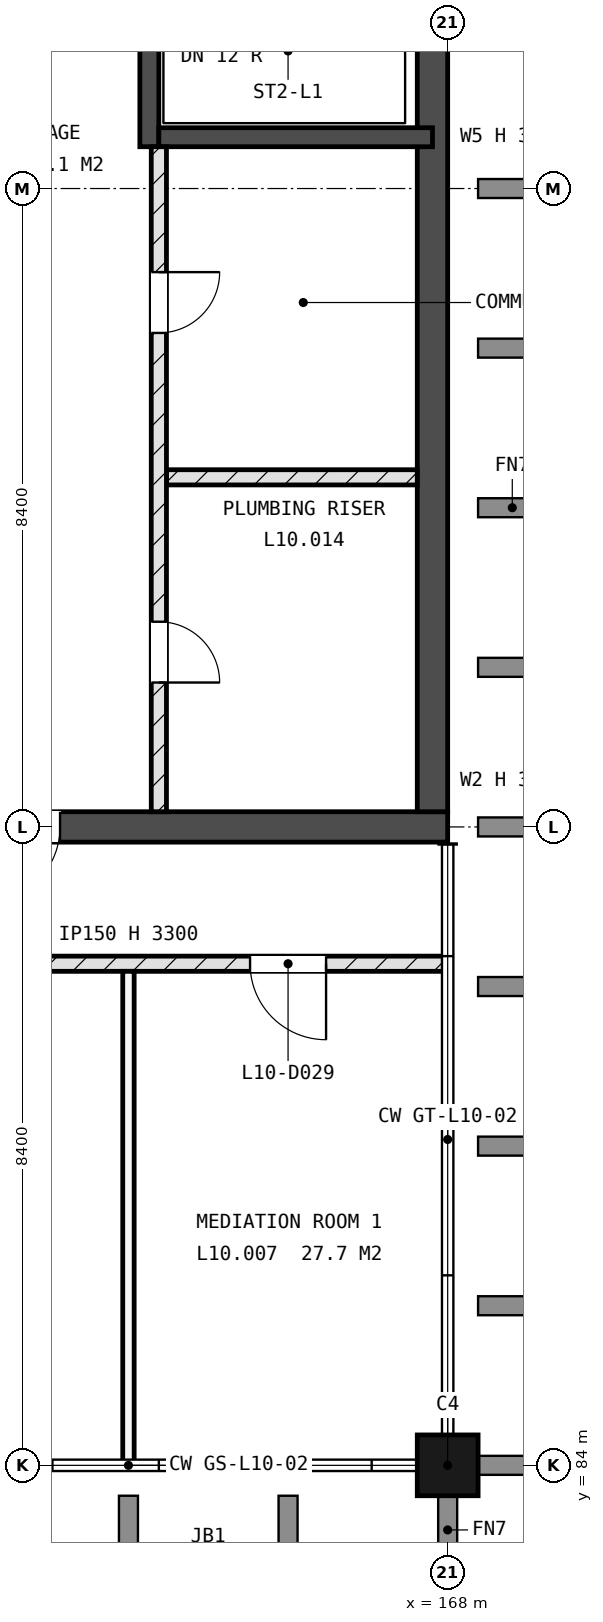
"""IFC4 building model, lengths in metres.
Left out: names, types, materials, properties, quantities, classifications, styles, units other than length and angle.
Written with IfcOpenShell. Run it as: python <this file> out.ifc"""

import sys

from ifc_helpers import new_model, si_unit, direction, frame, frame_2d, origin, origin_2d, place, context, subcontext, project, spatial, rectangle, extrude, element, fill, save


model = new_model("IFC4")
c1 = context("Model", 3, precision=1e-05, world=origin(), true_north=direction((0.0, 1.0)))
c2 = subcontext(c1, "Body", "Model", "MODEL_VIEW")
j1 = project(units=[si_unit("LENGTHUNIT", "METRE"), si_unit("PLANEANGLEUNIT", "RADIAN")], contexts=[c1])
p1 = place(None, origin())
s1 = spatial("IfcSite", under=j1, at=p1, CompositionType="ELEMENT")
p2 = place(p1, origin())
s2 = spatial("IfcBuilding", under=s1, at=p2, CompositionType="ELEMENT")
p3 = place(p2, frame((0.0, 0.0, 39.6)))
s3 = spatial("IfcBuildingStorey", under=s2, at=p3, CompositionType="ELEMENT", Elevation=39.6)
p4 = place(p3, frame((168.0, 84.0, -0.225), z_axis=(0.0, 0.0, 1.0), x_axis=(1.0, 0.0, 0.0)))
e1 = element("IfcColumn", 1, at=p4, inside=s3, PredefinedType="COLUMN", context=c2, shape_type="SweptSolid", body=[
    extrude(rectangle(XDim=0.8, YDim=0.8, at=origin_2d()), origin(), (0.0, 0.0, 1.0), 3.6),
])
p5 = place(p3, frame((142.8, 92.4, -0.225), z_axis=(0.0, 0.0, 1.0), x_axis=(1.0, 0.0, 0.0)))
e2 = element("IfcWall", 2, at=p5, inside=s3, PredefinedType="SHEAR", context=c2, shape_type="SweptSolid", body=[
    extrude(rectangle(XDim=25.2, YDim=0.4, at=frame_2d((12.6, 0.0))), origin(), (0.0, 0.0, 1.0), 3.6),
])
p6 = place(p5, frame((1.4, 0.0, 0.225)))
e3 = element("IfcOpeningElement", 3, at=p6, cuts=e2, PredefinedType="OPENING", context=c2, shape_type="SweptSolid", body=[
    extrude(rectangle(XDim=1.0, YDim=2.1, at=frame_2d((0.5, 1.05))), frame((0.0, 0.21, 0.0), z_axis=(0.0, -1.0, 0.0), x_axis=(1.0, 0.0, 0.0)), (0.0, 0.0, 1.0), 0.42),
])
p7 = place(p5, frame((19.1, 0.0, 0.225)))
e4 = element("IfcOpeningElement", 4, at=p7, cuts=e2, PredefinedType="OPENING", context=c2, shape_type="SweptSolid", body=[
    extrude(rectangle(XDim=1.0, YDim=2.1, at=frame_2d((0.5, 1.05))), frame((0.0, 0.21, 0.0), z_axis=(0.0, -1.0, 0.0), x_axis=(1.0, 0.0, 0.0)), (0.0, 0.0, 1.0), 0.42),
])
p8 = place(p5, frame((10.4, 0.0, 0.225)))
e5 = element("IfcOpeningElement", 5, at=p8, cuts=e2, PredefinedType="OPENING", context=c2, shape_type="SweptSolid", body=[
    extrude(rectangle(XDim=1.0, YDim=2.1, at=frame_2d((0.5, 1.05))), frame((0.0, 0.21, 0.0), z_axis=(0.0, -1.0, 0.0), x_axis=(1.0, 0.0, 0.0)), (0.0, 0.0, 1.0), 0.42),
])
p9 = place(p3, frame((167.8, 92.6, -0.225), z_axis=(0.0, 0.0, 1.0), x_axis=(0.0, 1.0, 0.0)))
e6 = element("IfcWall", 6, at=p9, inside=s3, PredefinedType="SHEAR", context=c2, shape_type="SweptSolid", body=[
    extrude(rectangle(XDim=16.4, YDim=0.4, at=frame_2d((8.2, 0.0))), origin(), (0.0, 0.0, 1.0), 3.6),
])
p10 = place(p9, frame((12.2, 0.0, 1.825)))
e7 = element("IfcOpeningElement", 7, at=p10, cuts=e6, PredefinedType="OPENING", context=c2, shape_type="SweptSolid", body=[
    extrude(rectangle(XDim=1.2, YDim=0.9, at=frame_2d((0.6, 0.45))), frame((0.0, 0.21, 0.0), z_axis=(0.0, -1.0, 0.0), x_axis=(1.0, 0.0, 0.0)), (0.0, 0.0, 1.0), 0.42),
])
p11 = place(p3, frame((164.075, 101.35, -0.225), z_axis=(0.0, 0.0, 1.0), x_axis=(0.0, 1.0, 0.0)))
e8 = element("IfcWall", 8, at=p11, inside=s3, PredefinedType="SHEAR", context=c2, shape_type="SweptSolid", body=[
    extrude(rectangle(XDim=7.65, YDim=0.25, at=frame_2d((3.825, 0.0))), origin(), (0.0, 0.0, 1.0), 3.6),
])
p12 = place(p11, frame((6.55, 0.0, 0.225)))
e9 = element("IfcOpeningElement", 9, at=p12, cuts=e8, PredefinedType="OPENING", context=c2, shape_type="SweptSolid", body=[
    extrude(rectangle(XDim=1.0, YDim=2.1, at=frame_2d((0.5, 1.05))), frame((0.0, 0.135, 0.0), z_axis=(0.0, -1.0, 0.0), x_axis=(1.0, 0.0, 0.0)), (0.0, 0.0, 1.0), 0.27),
])
p13 = place(p3, frame((164.2, 101.475, -0.225), z_axis=(0.0, 0.0, 1.0), x_axis=(1.0, 0.0, 0.0)))
e10 = element("IfcWall", 10, at=p13, inside=s3, PredefinedType="SHEAR", context=c2, shape_type="SweptSolid", body=[
    extrude(rectangle(XDim=3.6, YDim=0.25, at=frame_2d((1.8, 0.0))), origin(), (0.0, 0.0, 1.0), 3.6),
])
p14 = place(p3, frame((151.2, 90.6, 0.0), z_axis=(0.0, 0.0, 1.0), x_axis=(1.0, 0.0, 0.0)))
e11 = element("IfcWall", 11, at=p14, inside=s3, PredefinedType="SOLIDWALL", context=c2, shape_type="SweptSolid", body=[
    extrude(rectangle(XDim=16.8, YDim=0.2, at=frame_2d((8.4, 0.0))), origin(), (0.0, 0.0, 1.0), 3.3),
])
p15 = place(p14, frame((5.8, 0.0, 0.0)))
e12 = element("IfcOpeningElement", 12, at=p15, cuts=e11, PredefinedType="OPENING", context=c2, shape_type="SweptSolid", body=[
    extrude(rectangle(XDim=1.0, YDim=2.1, at=frame_2d((0.5, 1.05))), frame((0.0, 0.11, 0.0), z_axis=(0.0, -1.0, 0.0), x_axis=(1.0, 0.0, 0.0)), (0.0, 0.0, 1.0), 0.22),
])
p16 = place(p14, frame((14.2, 0.0, 0.0)))
e13 = element("IfcOpeningElement", 13, at=p16, cuts=e11, PredefinedType="OPENING", context=c2, shape_type="SweptSolid", body=[
    extrude(rectangle(XDim=1.0, YDim=2.1, at=frame_2d((0.5, 1.05))), frame((0.0, 0.11, 0.0), z_axis=(0.0, -1.0, 0.0), x_axis=(1.0, 0.0, 0.0)), (0.0, 0.0, 1.0), 0.22),
])
p17 = place(p3, frame((164.3, 97.0, 0.0), z_axis=(0.0, 0.0, 1.0), x_axis=(1.0, 0.0, 0.0)))
e14 = element("IfcWall", 14, at=p17, inside=s3, PredefinedType="SOLIDWALL", context=c2, shape_type="SweptSolid", body=[
    extrude(rectangle(XDim=3.3, YDim=0.2, at=frame_2d((1.65, 0.0))), origin(), (0.0, 0.0, 1.0), 3.3),
])
p18 = place(p3, frame((163.8, 84.0, 0.0), z_axis=(0.0, 0.0, 1.0), x_axis=(0.0, 1.0, 0.0)))
e15 = element("IfcWall", 15, at=p18, inside=s3, PredefinedType="PARTITIONING", context=c2, shape_type="SweptSolid", body=[
    extrude(rectangle(XDim=6.5, YDim=0.15, at=frame_2d((3.25, 0.0))), origin(), (0.0, 0.0, 1.0), 3.3),
])
p19 = place(p3, frame((164.2, 92.6, 0.0), z_axis=(0.0, 0.0, 1.0), x_axis=(0.0, 1.0, 0.0)))
e16 = element("IfcWall", 16, at=p19, inside=s3, PredefinedType="SOLIDWALL", context=c2, shape_type="SweptSolid", body=[
    extrude(rectangle(XDim=8.75, YDim=0.2, at=frame_2d((4.375, 0.0))), origin(), (0.0, 0.0, 1.0), 3.3),
])
p20 = place(p19, frame((1.7, 0.0, 0.0)))
e17 = element("IfcOpeningElement", 17, at=p20, cuts=e16, PredefinedType="OPENING", context=c2, shape_type="SweptSolid", body=[
    extrude(rectangle(XDim=0.8, YDim=2.1, at=frame_2d((0.4, 1.05))), frame((0.0, 0.11, 0.0), z_axis=(0.0, -1.0, 0.0), x_axis=(1.0, 0.0, 0.0)), (0.0, 0.0, 1.0), 0.22),
])
p21 = place(p19, frame((6.3, 0.0, 0.0)))
e18 = element("IfcOpeningElement", 18, at=p21, cuts=e16, PredefinedType="OPENING", context=c2, shape_type="SweptSolid", body=[
    extrude(rectangle(XDim=0.8, YDim=2.1, at=frame_2d((0.4, 1.05))), frame((0.0, 0.11, 0.0), z_axis=(0.0, -1.0, 0.0), x_axis=(1.0, 0.0, 0.0)), (0.0, 0.0, 1.0), 0.22),
])
p22 = place(p16, origin())
e19 = element("IfcDoor", 19, at=p22, inside=s3, OperationType="SINGLE_SWING_RIGHT", PredefinedType="DOOR", context=c2, shape_type="SweptSolid", body=[
    extrude(rectangle(XDim=1.0, YDim=2.1, at=frame_2d((0.5, 1.05))), frame((0.0, 0.025, 0.0), z_axis=(0.0, -1.0, 0.0), x_axis=(1.0, 0.0, 0.0)), (0.0, 0.0, 1.0), 0.05),
])
fill(e13, e19)
p23 = place(p20, origin())
e20 = element("IfcDoor", 20, at=p23, inside=s3, OperationType="SINGLE_SWING_LEFT", PredefinedType="DOOR", context=c2, shape_type="SweptSolid", body=[
    extrude(rectangle(XDim=0.8, YDim=2.1, at=frame_2d((0.4, 1.05))), frame((0.0, 0.025, 0.0), z_axis=(0.0, -1.0, 0.0), x_axis=(1.0, 0.0, 0.0)), (0.0, 0.0, 1.0), 0.05),
])
fill(e17, e20)
p24 = place(p21, origin())
e21 = element("IfcDoor", 21, at=p24, inside=s3, OperationType="SINGLE_SWING_RIGHT", PredefinedType="DOOR", context=c2, shape_type="SweptSolid", body=[
    extrude(rectangle(XDim=0.8, YDim=2.1, at=frame_2d((0.4, 1.05))), frame((0.0, 0.025, 0.0), z_axis=(0.0, -1.0, 0.0), x_axis=(1.0, 0.0, 0.0)), (0.0, 0.0, 1.0), 0.05),
])
fill(e18, e21)
p25 = place(p7, origin())
e22 = element("IfcDoor", 22, at=p25, inside=s3, OperationType="SINGLE_SWING_LEFT", PredefinedType="DOOR", context=c2, shape_type="SweptSolid", body=[
    extrude(rectangle(XDim=1.0, YDim=2.1, at=frame_2d((0.5, 1.05))), frame((0.0, 0.025, 0.0), z_axis=(0.0, -1.0, 0.0), x_axis=(1.0, 0.0, 0.0)), (0.0, 0.0, 1.0), 0.05),
])
fill(e4, e22)
save(model, sys.argv[1])
